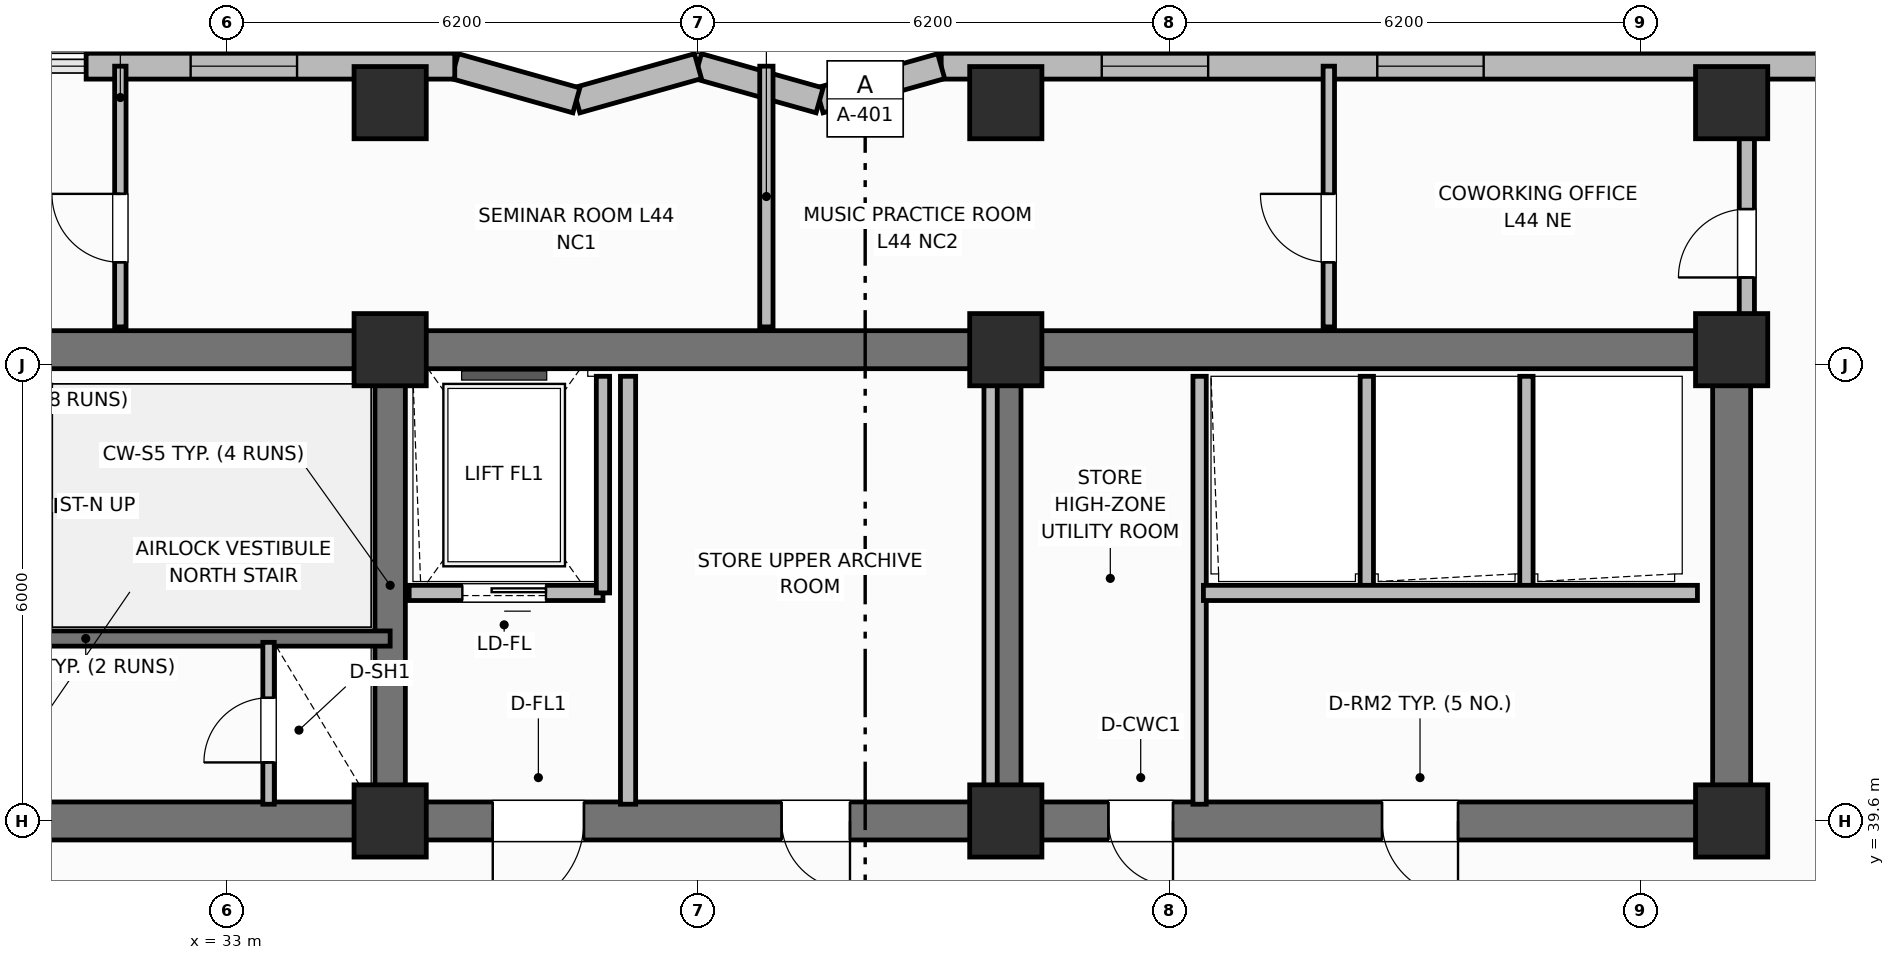
"""IFC4 building model, lengths in metres.
Left out: names, types, materials, properties, quantities, classifications, styles, units other than length and angle.
Written with IfcOpenShell. Run it as: python <this file> out.ifc"""

import sys

from ifc_helpers import new_model, si_unit, direction, frame, frame_2d, origin, origin_2d, place, context, subcontext, project, spatial, rectangle, extrude, element, fill, save


model = new_model("IFC4")
c1 = context("Model", 3, precision=1e-05, world=origin(), true_north=direction((0.0, 1.0)))
c2 = subcontext(c1, "Body", "Model", "MODEL_VIEW")
j1 = project(units=[si_unit("LENGTHUNIT", "METRE"), si_unit("PLANEANGLEUNIT", "RADIAN")], contexts=[c1])
p1 = place(None, origin())
s1 = spatial("IfcSite", under=j1, at=p1, CompositionType="ELEMENT")
p2 = place(p1, origin())
s2 = spatial("IfcBuilding", under=s1, at=p2, CompositionType="ELEMENT")
p3 = place(p2, frame((0.0, 0.0, 177.4)))
s3 = spatial("IfcBuildingStorey", under=s2, at=p3, CompositionType="ELEMENT", Elevation=177.4)
p4 = place(p3, frame((25.6, 45.8, 0.0), z_axis=(0.0, 0.0, 1.0), x_axis=(1.0, 0.0, 0.0)))
e1 = element("IfcWall", 1, at=p4, inside=s3, PredefinedType="SHEAR", context=c2, shape_type="SweptSolid", body=[
    extrude(rectangle(XDim=27.2, YDim=0.5, at=frame_2d((13.6, 0.0))), origin(), (0.0, 0.0, 1.0), 3.7),
])
p5 = place(p3, frame((52.8, 39.85, 0.0), z_axis=(0.0, 0.0, 1.0), x_axis=(0.0, 1.0, 0.0)))
e2 = element("IfcWall", 2, at=p5, inside=s3, PredefinedType="SHEAR", context=c2, shape_type="SweptSolid", body=[
    extrude(rectangle(XDim=5.7, YDim=0.5, at=frame_2d((2.85, 0.0))), origin(), (0.0, 0.0, 1.0), 3.7),
])
p6 = place(p3, frame((52.8, 39.6, 0.0), z_axis=(0.0, 0.0, 1.0), x_axis=(-1.0, 0.0, 0.0)))
e3 = element("IfcWall", 3, at=p6, inside=s3, PredefinedType="SHEAR", context=c2, shape_type="SweptSolid", body=[
    extrude(rectangle(XDim=27.2, YDim=0.5, at=frame_2d((13.6, 0.0))), origin(), (0.0, 0.0, 1.0), 3.7),
])
p7 = place(p6, frame((24.2, 0.0, 0.0)))
e4 = element("IfcOpeningElement", 4, at=p7, cuts=e3, PredefinedType="OPENING", context=c2, shape_type="SweptSolid", body=[
    extrude(rectangle(XDim=1.1, YDim=2.15, at=frame_2d((0.55, 1.075))), frame((0.0, 0.26, 0.0), z_axis=(0.0, -1.0, 0.0), x_axis=(1.0, 0.0, 0.0)), (0.0, 0.0, 1.0), 0.52),
])
p8 = place(p6, frame((15.1, 0.0, 0.0)))
e5 = element("IfcOpeningElement", 5, at=p8, cuts=e3, PredefinedType="OPENING", context=c2, shape_type="SweptSolid", body=[
    extrude(rectangle(XDim=1.2, YDim=2.15, at=frame_2d((0.6, 1.075))), frame((0.0, 0.26, 0.0), z_axis=(0.0, -1.0, 0.0), x_axis=(1.0, 0.0, 0.0)), (0.0, 0.0, 1.0), 0.52),
])
p9 = place(p6, frame((11.6, 0.0, 0.0)))
e6 = element("IfcOpeningElement", 6, at=p9, cuts=e3, PredefinedType="OPENING", context=c2, shape_type="SweptSolid", body=[
    extrude(rectangle(XDim=0.9, YDim=2.1, at=frame_2d((0.45, 1.05))), frame((0.0, 0.26, 0.0), z_axis=(0.0, -1.0, 0.0), x_axis=(1.0, 0.0, 0.0)), (0.0, 0.0, 1.0), 0.52),
])
p10 = place(p6, frame((7.35, 0.0, 0.0)))
e7 = element("IfcOpeningElement", 7, at=p10, cuts=e3, PredefinedType="OPENING", context=c2, shape_type="SweptSolid", body=[
    extrude(rectangle(XDim=0.85, YDim=2.1, at=frame_2d((0.425, 1.05))), frame((0.0, 0.26, 0.0), z_axis=(0.0, -1.0, 0.0), x_axis=(1.0, 0.0, 0.0)), (0.0, 0.0, 1.0), 0.52),
])
p11 = place(p6, frame((3.6, 0.0, 0.0)))
e8 = element("IfcOpeningElement", 8, at=p11, cuts=e3, PredefinedType="OPENING", context=c2, shape_type="SweptSolid", body=[
    extrude(rectangle(XDim=1.0, YDim=2.15, at=frame_2d((0.5, 1.075))), frame((0.0, 0.26, 0.0), z_axis=(0.0, -1.0, 0.0), x_axis=(1.0, 0.0, 0.0)), (0.0, 0.0, 1.0), 0.52),
])
for number, where, z_axis, x_axis in (
    (9, (35.15, 39.85, 0.0), (0.0, 0.0, 1.0), (0.0, 1.0, 0.0)),
    (10, (43.25, 39.85, 0.0), (0.0, 0.0, 1.0), (0.0, 1.0, 0.0)),
):
    element("IfcWall", number, at=place(p3, frame(where, z_axis=z_axis, x_axis=x_axis)), inside=s3, PredefinedType="SHEAR", context=c2, shape_type="SweptSolid", body=[
        extrude(rectangle(XDim=5.7, YDim=0.4, at=frame_2d((2.85, 0.0))), origin(), (0.0, 0.0, 1.0), 3.7),
    ])
for number, where, z_axis, x_axis in (
    (11, (35.15, 39.6, 0.0), (0.0, 0.0, 1.0), (1.0, 0.0, 0.0)),
    (12, (35.15, 45.8, 0.0), (0.0, 0.0, 1.0), (1.0, 0.0, 0.0)),
    (13, (43.25, 39.6, 0.0), (0.0, 0.0, 1.0), (1.0, 0.0, 0.0)),
    (14, (43.25, 45.8, 0.0), (0.0, 0.0, 1.0), (1.0, 0.0, 0.0)),
    (15, (52.8, 39.6, 0.0), (0.0, 0.0, 1.0), (1.0, 0.0, 0.0)),
    (16, (52.8, 45.8, 0.0), (0.0, 0.0, 1.0), (1.0, 0.0, 0.0)),
    (17, (35.15, 49.05, 0.0), (0.0, 0.0, 1.0), (1.0, 0.0, 0.0)),
    (18, (43.25, 49.05, 0.0), (0.0, 0.0, 1.0), (1.0, 0.0, 0.0)),
    (19, (52.8, 49.05, 0.0), (0.0, 0.0, 1.0), (1.0, 0.0, 0.0)),
):
    element("IfcColumn", number, at=place(p3, frame(where, z_axis=z_axis, x_axis=x_axis)), inside=s3, PredefinedType="COLUMN", context=c2, shape_type="SweptSolid", body=[
        extrude(rectangle(XDim=0.95, YDim=0.95, at=origin_2d()), origin(), (0.0, 0.0, 1.0), 3.7),
    ])
p12 = place(p3, frame((58.2, 49.53, 0.0), z_axis=(0.0, 0.0, 1.0), x_axis=(-1.0, 0.0, 0.0)))
e20 = element("IfcWall", 20, at=p12, inside=s3, PredefinedType="SOLIDWALL", context=c2, shape_type="SweptSolid", body=[
    extrude(rectangle(XDim=15.8, YDim=0.34, at=frame_2d((7.9, 0.0))), origin(), (0.0, 0.0, 1.0), 2.72),
])
p13 = place(p12, frame((1.762, 0.0, 0.75)))
e21 = element("IfcOpeningElement", 21, at=p13, cuts=e20, PredefinedType="OPENING", context=c2, shape_type="SweptSolid", body=[
    extrude(rectangle(XDim=1.4, YDim=1.85, at=frame_2d((0.7, 0.925))), frame((0.0, 0.18, 0.0), z_axis=(0.0, -1.0, 0.0), x_axis=(1.0, 0.0, 0.0)), (0.0, 0.0, 1.0), 0.36),
])
p14 = place(p12, frame((8.663, 0.0, 0.75)))
e22 = element("IfcOpeningElement", 22, at=p14, cuts=e20, PredefinedType="OPENING", context=c2, shape_type="SweptSolid", body=[
    extrude(rectangle(XDim=1.4, YDim=1.85, at=frame_2d((0.7, 0.925))), frame((0.0, 0.18, 0.0), z_axis=(0.0, -1.0, 0.0), x_axis=(1.0, 0.0, 0.0)), (0.0, 0.0, 1.0), 0.36),
])
p15 = place(p12, frame((12.288, 0.0, 0.75)))
e23 = element("IfcOpeningElement", 23, at=p15, cuts=e20, PredefinedType="OPENING", context=c2, shape_type="SweptSolid", body=[
    extrude(rectangle(XDim=1.4, YDim=1.85, at=frame_2d((0.7, 0.925))), frame((0.0, 0.18, 0.0), z_axis=(0.0, -1.0, 0.0), x_axis=(1.0, 0.0, 0.0)), (0.0, 0.0, 1.0), 0.36),
])
p16 = place(p3, frame((42.4, 49.53, 0.0), z_axis=(0.0, 0.0, 1.0), x_axis=(-0.962652136636, -0.270741322725, 0.0)))
e24 = element("IfcWall", 24, at=p16, inside=s3, PredefinedType="SOLIDWALL", context=c2, shape_type="SweptSolid", body=[
    extrude(rectangle(XDim=1.662, YDim=0.34, at=frame_2d((0.831, 0.0))), origin(), (0.0, 0.0, 1.0), 2.72),
])
p17 = place(p3, frame((40.8, 49.08, 0.0), z_axis=(0.0, 0.0, 1.0), x_axis=(-0.962662902433, 0.270703040766, 0.0)))
e25 = element("IfcWall", 25, at=p17, inside=s3, PredefinedType="SOLIDWALL", context=c2, shape_type="SweptSolid", body=[
    extrude(rectangle(XDim=1.662, YDim=0.34, at=frame_2d((0.831, 0.0))), origin(), (0.0, 0.0, 1.0), 2.72),
])
p18 = place(p3, frame((39.2, 49.53, 0.0), z_axis=(0.0, 0.0, 1.0), x_axis=(-0.962652136636, -0.270741322725, 0.0)))
e26 = element("IfcWall", 26, at=p18, inside=s3, PredefinedType="SOLIDWALL", context=c2, shape_type="SweptSolid", body=[
    extrude(rectangle(XDim=1.662, YDim=0.34, at=frame_2d((0.831, 0.0))), origin(), (0.0, 0.0, 1.0), 2.72),
])
p19 = place(p3, frame((37.6, 49.08, 0.0), z_axis=(0.0, 0.0, 1.0), x_axis=(-0.962662902433, 0.270703040766, 0.0)))
e27 = element("IfcWall", 27, at=p19, inside=s3, PredefinedType="SOLIDWALL", context=c2, shape_type="SweptSolid", body=[
    extrude(rectangle(XDim=1.662, YDim=0.34, at=frame_2d((0.831, 0.0))), origin(), (0.0, 0.0, 1.0), 2.72),
])
p20 = place(p3, frame((36.0, 49.53, 0.0), z_axis=(0.0, 0.0, 1.0), x_axis=(-1.0, 0.0, 0.0)))
e28 = element("IfcWall", 28, at=p20, inside=s3, PredefinedType="SOLIDWALL", context=c2, shape_type="SweptSolid", body=[
    extrude(rectangle(XDim=4.85, YDim=0.34, at=frame_2d((2.425, 0.0))), origin(), (0.0, 0.0, 1.0), 2.72),
])
p21 = place(p20, frame((2.075, 0.0, 0.75)))
e29 = element("IfcOpeningElement", 29, at=p21, cuts=e28, PredefinedType="OPENING", context=c2, shape_type="SweptSolid", body=[
    extrude(rectangle(XDim=1.4, YDim=1.85, at=frame_2d((0.7, 0.925))), frame((0.0, 0.18, 0.0), z_axis=(0.0, -1.0, 0.0), x_axis=(1.0, 0.0, 0.0)), (0.0, 0.0, 1.0), 0.36),
])
p22 = place(p3, frame((35.15, 42.0, 0.0), z_axis=(0.0, 0.0, 1.0), x_axis=(-1.0, 0.0, 0.0)))
e30 = element("IfcWall", 30, at=p22, inside=s3, PredefinedType="SHEAR", context=c2, shape_type="SweptSolid", body=[
    extrude(rectangle(XDim=9.55, YDim=0.2, at=frame_2d((4.775, 0.0))), origin(), (0.0, 0.0, 1.0), 3.7),
])
p23 = place(p22, frame((7.25, 0.0, 0.0)))
e31 = element("IfcOpeningElement", 31, at=p23, cuts=e30, PredefinedType="OPENING", context=c2, shape_type="SweptSolid", body=[
    extrude(rectangle(XDim=1.1, YDim=2.15, at=frame_2d((0.55, 1.075))), frame((0.0, 0.11, 0.0), z_axis=(0.0, -1.0, 0.0), x_axis=(1.0, 0.0, 0.0)), (0.0, 0.0, 1.0), 0.22),
])
p24 = place(p3, frame((33.55, 39.82, 0.0), z_axis=(0.0, 0.0, 1.0), x_axis=(0.0, 1.0, 0.0)))
e32 = element("IfcWall", 32, at=p24, inside=s3, PredefinedType="PARTITIONING", context=c2, shape_type="SweptSolid", body=[
    extrude(rectangle(XDim=2.13, YDim=0.15, at=frame_2d((1.065, 0.0))), origin(), (0.0, 0.0, 1.0), 2.55),
])
p25 = place(p24, frame((0.55, 0.0, 0.0)))
e33 = element("IfcOpeningElement", 33, at=p25, cuts=e32, PredefinedType="OPENING", context=c2, shape_type="SweptSolid", body=[
    extrude(rectangle(XDim=0.85, YDim=2.05, at=frame_2d((0.425, 1.025))), frame((0.0, 0.085, 0.0), z_axis=(0.0, -1.0, 0.0), x_axis=(1.0, 0.0, 0.0)), (0.0, 0.0, 1.0), 0.17),
])
p26 = place(p3, frame((37.95, 42.6, 0.0), z_axis=(0.0, 0.0, 1.0), x_axis=(-1.0, 0.0, 0.0)))
e34 = element("IfcWall", 34, at=p26, inside=s3, PredefinedType="PARTITIONING", context=c2, shape_type="SweptSolid", body=[
    extrude(rectangle(XDim=2.55, YDim=0.2, at=frame_2d((1.275, 0.0))), origin(), (0.0, 0.0, 1.0), 2.32),
])
p27 = place(p26, frame((0.75, 0.0, 0.0)))
e35 = element("IfcOpeningElement", 35, at=p27, cuts=e34, PredefinedType="OPENING", context=c2, shape_type="SweptSolid", body=[
    extrude(rectangle(XDim=1.1, YDim=2.15, at=frame_2d((0.55, 1.075))), frame((0.0, 0.11, 0.0), z_axis=(0.0, -1.0, 0.0), x_axis=(1.0, 0.0, 0.0)), (0.0, 0.0, 1.0), 0.22),
])
p28 = place(p3, frame((37.95, 42.6, 0.0), z_axis=(0.0, 0.0, 1.0), x_axis=(0.0, 1.0, 0.0)))
e36 = element("IfcWall", 36, at=p28, inside=s3, PredefinedType="PARTITIONING", context=c2, shape_type="SweptSolid", body=[
    extrude(rectangle(XDim=2.85, YDim=0.175, at=frame_2d((1.425, 0.0))), origin(), (0.0, 0.0, 1.0), 2.55),
])
p29 = place(p3, frame((38.28, 39.82, 0.0), z_axis=(0.0, 0.0, 1.0), x_axis=(0.0, 1.0, 0.0)))
e37 = element("IfcWall", 37, at=p29, inside=s3, PredefinedType="PARTITIONING", context=c2, shape_type="SweptSolid", body=[
    extrude(rectangle(XDim=5.63, YDim=0.2, at=frame_2d((2.815, 0.0))), origin(), (0.0, 0.0, 1.0), 2.55),
])
for number, where, z_axis, x_axis in (
    (38, (43.05, 39.82, 0.0), (0.0, 0.0, 1.0), (0.0, 1.0, 0.0)),
    (39, (45.8, 39.82, 0.0), (0.0, 0.0, 1.0), (0.0, 1.0, 0.0)),
):
    element("IfcWall", number, at=place(p3, frame(where, z_axis=z_axis, x_axis=x_axis)), inside=s3, PredefinedType="PARTITIONING", context=c2, shape_type="SweptSolid", body=[
        extrude(rectangle(XDim=5.63, YDim=0.175, at=frame_2d((2.815, 0.0))), origin(), (0.0, 0.0, 1.0), 2.55),
    ])
for number, where, z_axis, x_axis in (
    (40, (48.0, 42.65, 0.0), (0.0, 0.0, 1.0), (0.0, 1.0, 0.0)),
    (41, (50.1, 42.65, 0.0), (0.0, 0.0, 1.0), (0.0, 1.0, 0.0)),
):
    element("IfcWall", number, at=place(p3, frame(where, z_axis=z_axis, x_axis=x_axis)), inside=s3, PredefinedType="PARTITIONING", context=c2, shape_type="SweptSolid", body=[
        extrude(rectangle(XDim=2.8, YDim=0.175, at=frame_2d((1.4, 0.0))), origin(), (0.0, 0.0, 1.0), 2.55),
    ])
p30 = place(p3, frame((52.35, 42.6, 0.0), z_axis=(0.0, 0.0, 1.0), x_axis=(-1.0, 0.0, 0.0)))
e42 = element("IfcWall", 42, at=p30, inside=s3, PredefinedType="PARTITIONING", context=c2, shape_type="SweptSolid", body=[
    extrude(rectangle(XDim=6.5, YDim=0.2, at=frame_2d((3.25, 0.0))), origin(), (0.0, 0.0, 1.0), 2.55),
])
p31 = place(p3, frame((31.6, 46.1, 0.0), z_axis=(0.0, 0.0, 1.0), x_axis=(0.0, 1.0, 0.0)))
e43 = element("IfcWall", 43, at=p31, inside=s3, PredefinedType="PARTITIONING", context=c2, shape_type="SweptSolid", body=[
    extrude(rectangle(XDim=3.43, YDim=0.15, at=frame_2d((1.715, 0.0))), origin(), (0.0, 0.0, 1.0), 2.55),
])
p32 = place(p31, frame((0.85, 0.0, 0.0)))
e44 = element("IfcOpeningElement", 44, at=p32, cuts=e43, PredefinedType="OPENING", context=c2, shape_type="SweptSolid", body=[
    extrude(rectangle(XDim=0.9, YDim=2.1, at=frame_2d((0.45, 1.05))), frame((0.0, 0.085, 0.0), z_axis=(0.0, -1.0, 0.0), x_axis=(1.0, 0.0, 0.0)), (0.0, 0.0, 1.0), 0.17),
])
p33 = place(p3, frame((40.1, 46.1, 0.0), z_axis=(0.0, 0.0, 1.0), x_axis=(0.0, 1.0, 0.0)))
e45 = element("IfcWall", 45, at=p33, inside=s3, PredefinedType="PARTITIONING", context=c2, shape_type="SweptSolid", body=[
    extrude(rectangle(XDim=3.43, YDim=0.175, at=frame_2d((1.715, 0.0))), origin(), (0.0, 0.0, 1.0), 2.55),
])
p34 = place(p3, frame((47.5, 46.1, 0.0), z_axis=(0.0, 0.0, 1.0), x_axis=(0.0, 1.0, 0.0)))
e46 = element("IfcWall", 46, at=p34, inside=s3, PredefinedType="PARTITIONING", context=c2, shape_type="SweptSolid", body=[
    extrude(rectangle(XDim=3.43, YDim=0.15, at=frame_2d((1.715, 0.0))), origin(), (0.0, 0.0, 1.0), 2.55),
])
p35 = place(p34, frame((0.85, 0.0, 0.0)))
e47 = element("IfcOpeningElement", 47, at=p35, cuts=e46, PredefinedType="OPENING", context=c2, shape_type="SweptSolid", body=[
    extrude(rectangle(XDim=0.9, YDim=2.1, at=frame_2d((0.45, 1.05))), frame((0.0, 0.085, 0.0), z_axis=(0.0, -1.0, 0.0), x_axis=(1.0, 0.0, 0.0)), (0.0, 0.0, 1.0), 0.17),
])
p36 = place(p3, frame((53.0, 46.1, 0.0), z_axis=(0.0, 0.0, 1.0), x_axis=(0.0, 1.0, 0.0)))
e48 = element("IfcWall", 48, at=p36, inside=s3, PredefinedType="PARTITIONING", context=c2, shape_type="SweptSolid", body=[
    extrude(rectangle(XDim=2.68, YDim=0.2, at=frame_2d((1.34, 0.0))), origin(), (0.0, 0.0, 1.0), 2.55),
])
p37 = place(p36, frame((0.65, 0.0, 0.0)))
e49 = element("IfcOpeningElement", 49, at=p37, cuts=e48, PredefinedType="OPENING", context=c2, shape_type="SweptSolid", body=[
    extrude(rectangle(XDim=0.9, YDim=2.1, at=frame_2d((0.45, 1.05))), frame((0.0, 0.11, 0.0), z_axis=(0.0, -1.0, 0.0), x_axis=(1.0, 0.0, 0.0)), (0.0, 0.0, 1.0), 0.22),
])
p38 = place(p14, origin())
e50 = element("IfcWindow", 50, at=p38, inside=s3, PartitioningType="SINGLE_PANEL", PredefinedType="WINDOW", context=c2, shape_type="SweptSolid", body=[
    extrude(rectangle(XDim=1.4, YDim=1.85, at=frame_2d((0.7, 0.925))), frame((0.0, 0.03, 0.0), z_axis=(0.0, -1.0, 0.0), x_axis=(1.0, 0.0, 0.0)), (0.0, 0.0, 1.0), 0.06),
])
fill(e22, e50)
p39 = place(p15, origin())
e51 = element("IfcWindow", 51, at=p39, inside=s3, PartitioningType="SINGLE_PANEL", PredefinedType="WINDOW", context=c2, shape_type="SweptSolid", body=[
    extrude(rectangle(XDim=1.4, YDim=1.85, at=frame_2d((0.7, 0.925))), frame((0.0, 0.03, 0.0), z_axis=(0.0, -1.0, 0.0), x_axis=(1.0, 0.0, 0.0)), (0.0, 0.0, 1.0), 0.06),
])
fill(e23, e51)
p40 = place(p21, origin())
e52 = element("IfcWindow", 52, at=p40, inside=s3, PartitioningType="SINGLE_PANEL", PredefinedType="WINDOW", context=c2, shape_type="SweptSolid", body=[
    extrude(rectangle(XDim=1.4, YDim=1.85, at=frame_2d((0.7, 0.925))), frame((0.0, 0.03, 0.0), z_axis=(0.0, -1.0, 0.0), x_axis=(1.0, 0.0, 0.0)), (0.0, 0.0, 1.0), 0.06),
])
fill(e29, e52)
p41 = place(p25, origin())
e53 = element("IfcDoor", 53, at=p41, inside=s3, OperationType="SINGLE_SWING_LEFT", PredefinedType="TRAPDOOR", context=c2, shape_type="SweptSolid", body=[
    extrude(rectangle(XDim=0.85, YDim=2.05, at=frame_2d((0.425, 1.025))), frame((0.0, 0.025, 0.0), z_axis=(0.0, -1.0, 0.0), x_axis=(1.0, 0.0, 0.0)), (0.0, 0.0, 1.0), 0.05),
])
fill(e33, e53)
p42 = place(p27, origin())
e54 = element("IfcDoor", 54, at=p42, inside=s3, OperationType="SLIDING_TO_LEFT", PredefinedType="DOOR", context=c2, shape_type="SweptSolid", body=[
    extrude(rectangle(XDim=1.1, YDim=2.15, at=frame_2d((0.55, 1.075))), frame((0.0, 0.025, 0.0), z_axis=(0.0, -1.0, 0.0), x_axis=(1.0, 0.0, 0.0)), (0.0, 0.0, 1.0), 0.05),
])
fill(e35, e54)
p43 = place(p32, origin())
e55 = element("IfcDoor", 55, at=p43, inside=s3, OperationType="SINGLE_SWING_RIGHT", PredefinedType="DOOR", context=c2, shape_type="SweptSolid", body=[
    extrude(rectangle(XDim=0.9, YDim=2.1, at=frame_2d((0.45, 1.05))), frame((0.0, 0.025, 0.0), z_axis=(0.0, -1.0, 0.0), x_axis=(1.0, 0.0, 0.0)), (0.0, 0.0, 1.0), 0.05),
])
fill(e44, e55)
p44 = place(p35, origin())
e56 = element("IfcDoor", 56, at=p44, inside=s3, OperationType="SINGLE_SWING_RIGHT", PredefinedType="DOOR", context=c2, shape_type="SweptSolid", body=[
    extrude(rectangle(XDim=0.9, YDim=2.1, at=frame_2d((0.45, 1.05))), frame((0.0, 0.025, 0.0), z_axis=(0.0, -1.0, 0.0), x_axis=(1.0, 0.0, 0.0)), (0.0, 0.0, 1.0), 0.05),
])
fill(e47, e56)
p45 = place(p37, origin())
e57 = element("IfcDoor", 57, at=p45, inside=s3, OperationType="SINGLE_SWING_LEFT", PredefinedType="DOOR", context=c2, shape_type="SweptSolid", body=[
    extrude(rectangle(XDim=0.9, YDim=2.1, at=frame_2d((0.45, 1.05))), frame((0.0, 0.025, 0.0), z_axis=(0.0, -1.0, 0.0), x_axis=(1.0, 0.0, 0.0)), (0.0, 0.0, 1.0), 0.05),
])
fill(e49, e57)
p46 = place(p8, origin())
e58 = element("IfcDoor", 58, at=p46, inside=s3, OperationType="SINGLE_SWING_RIGHT", PredefinedType="DOOR", context=c2, shape_type="SweptSolid", body=[
    extrude(rectangle(XDim=1.2, YDim=2.15, at=frame_2d((0.6, 1.075))), frame((0.0, 0.025, 0.0), z_axis=(0.0, -1.0, 0.0), x_axis=(1.0, 0.0, 0.0)), (0.0, 0.0, 1.0), 0.05),
])
fill(e5, e58)
p47 = place(p9, origin())
e59 = element("IfcDoor", 59, at=p47, inside=s3, OperationType="SINGLE_SWING_LEFT", PredefinedType="DOOR", context=c2, shape_type="SweptSolid", body=[
    extrude(rectangle(XDim=0.9, YDim=2.1, at=frame_2d((0.45, 1.05))), frame((0.0, 0.025, 0.0), z_axis=(0.0, -1.0, 0.0), x_axis=(1.0, 0.0, 0.0)), (0.0, 0.0, 1.0), 0.05),
])
fill(e6, e59)
p48 = place(p10, origin())
e60 = element("IfcDoor", 60, at=p48, inside=s3, OperationType="SINGLE_SWING_LEFT", PredefinedType="DOOR", context=c2, shape_type="SweptSolid", body=[
    extrude(rectangle(XDim=0.85, YDim=2.1, at=frame_2d((0.425, 1.05))), frame((0.0, 0.025, 0.0), z_axis=(0.0, -1.0, 0.0), x_axis=(1.0, 0.0, 0.0)), (0.0, 0.0, 1.0), 0.05),
])
fill(e7, e60)
p49 = place(p11, origin())
e61 = element("IfcDoor", 61, at=p49, inside=s3, OperationType="SINGLE_SWING_LEFT", PredefinedType="DOOR", context=c2, shape_type="SweptSolid", body=[
    extrude(rectangle(XDim=1.0, YDim=2.15, at=frame_2d((0.5, 1.075))), frame((0.0, 0.025, 0.0), z_axis=(0.0, -1.0, 0.0), x_axis=(1.0, 0.0, 0.0)), (0.0, 0.0, 1.0), 0.05),
])
fill(e8, e61)
save(model, sys.argv[1])
